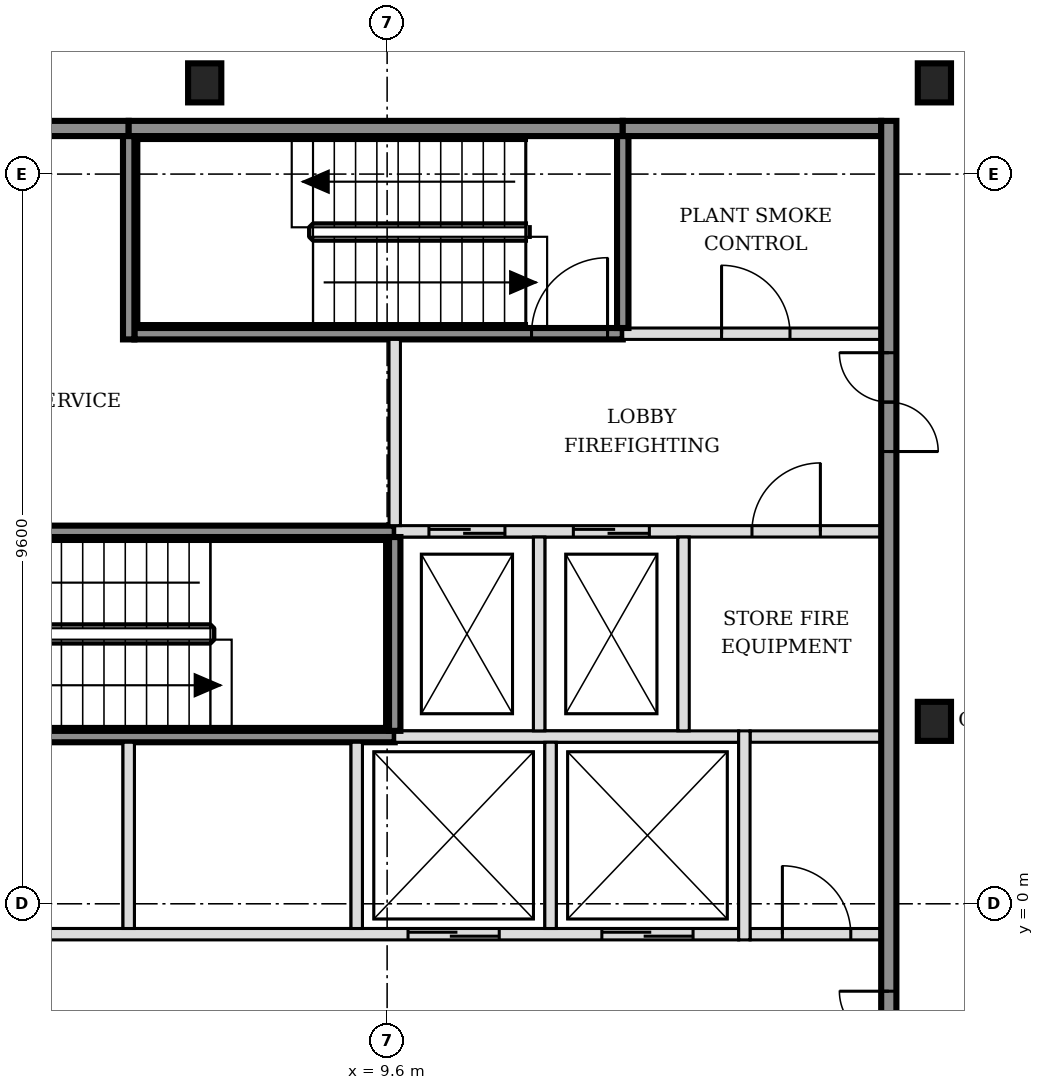
"""IFC4 building model, lengths in metres.
Left out: names, types, materials, properties, quantities, classifications, styles, units other than length and angle.
Written with IfcOpenShell. Run it as: python <this file> out.ifc"""

import sys

from ifc_helpers import new_model, si_unit, direction, frame, frame_2d, origin, origin_2d, place, context, subcontext, project, spatial, rectangle, i_section, extrude, element, fill, save


model = new_model("IFC4")
c1 = context("Model", 3, precision=1e-05, world=origin(), true_north=direction((0.0, 1.0)))
c2 = subcontext(c1, "Body", "Model", "MODEL_VIEW")
j1 = project(units=[si_unit("LENGTHUNIT", "METRE"), si_unit("PLANEANGLEUNIT", "RADIAN")], contexts=[c1])
p1 = place(None, origin())
s1 = spatial("IfcSite", under=j1, at=p1, CompositionType="ELEMENT")
p2 = place(p1, origin())
s2 = spatial("IfcBuilding", under=s1, at=p2, CompositionType="ELEMENT")
p3 = place(p2, frame((0.0, 0.0, 76.2)))
s3 = spatial("IfcBuildingStorey", under=s2, at=p3, CompositionType="ELEMENT", Elevation=76.2)
for number, where, z_axis, x_axis in (
    (1, (16.8, 2.4, -0.15), (0.0, 0.0, 1.0), (1.0, 0.0, 0.0)),
    (2, (7.2, 10.8, -0.15), (0.0, 0.0, 1.0), (1.0, 0.0, 0.0)),
    (3, (16.8, 10.8, -0.15), (0.0, 0.0, 1.0), (1.0, 0.0, 0.0)),
):
    element("IfcColumn", number, at=place(p3, frame(where, z_axis=z_axis, x_axis=x_axis)), inside=s3, PredefinedType="COLUMN", context=c2, shape_type="SweptSolid", body=[
        extrude(i_section(OverallWidth=0.437, OverallDepth=0.514, WebThickness=0.061, FlangeThickness=0.097, FilletRadius=0.015, at=origin_2d()), origin(), (0.0, 0.0, 1.0), 3.6),
    ])
p4 = place(p3, frame((-1.7, -0.4, 0.0), z_axis=(0.0, 0.0, 1.0), x_axis=(1.0, 0.0, 0.0)))
e4 = element("IfcWall", 4, at=p4, inside=s3, PredefinedType="SOLIDWALL", context=c2, shape_type="SweptSolid", body=[
    extrude(rectangle(XDim=15.925, YDim=0.15, at=frame_2d((7.962, 0.0))), origin(), (0.0, 0.0, 1.0), 3.45),
])
p5 = place(p4, frame((0.6, 0.0, 0.0)))
e5 = element("IfcOpeningElement", 5, at=p5, cuts=e4, PredefinedType="OPENING", context=c2, shape_type="SweptSolid", body=[
    extrude(rectangle(XDim=1.1, YDim=2.1, at=frame_2d((0.55, 1.05))), frame((0.0, 0.085, 0.0), z_axis=(0.0, -1.0, 0.0), x_axis=(1.0, 0.0, 0.0)), (0.0, 0.0, 1.0), 0.17),
])
p6 = place(p4, frame((3.1, 0.0, 0.0)))
e6 = element("IfcOpeningElement", 6, at=p6, cuts=e4, PredefinedType="OPENING", context=c2, shape_type="SweptSolid", body=[
    extrude(rectangle(XDim=1.1, YDim=2.1, at=frame_2d((0.55, 1.05))), frame((0.0, 0.085, 0.0), z_axis=(0.0, -1.0, 0.0), x_axis=(1.0, 0.0, 0.0)), (0.0, 0.0, 1.0), 0.17),
])
p7 = place(p4, frame((11.575, 0.0, 0.0)))
e7 = element("IfcOpeningElement", 7, at=p7, cuts=e4, PredefinedType="OPENING", context=c2, shape_type="SweptSolid", body=[
    extrude(rectangle(XDim=1.2, YDim=2.1, at=frame_2d((0.6, 1.05))), frame((0.0, 0.085, 0.0), z_axis=(0.0, -1.0, 0.0), x_axis=(1.0, 0.0, 0.0)), (0.0, 0.0, 1.0), 0.17),
])
p8 = place(p4, frame((14.125, 0.0, 0.0)))
e8 = element("IfcOpeningElement", 8, at=p8, cuts=e4, PredefinedType="OPENING", context=c2, shape_type="SweptSolid", body=[
    extrude(rectangle(XDim=1.2, YDim=2.1, at=frame_2d((0.6, 1.05))), frame((0.0, 0.085, 0.0), z_axis=(0.0, -1.0, 0.0), x_axis=(1.0, 0.0, 0.0)), (0.0, 0.0, 1.0), 0.17),
])
p9 = place(p3, frame((14.375, -0.4, 0.0), z_axis=(0.0, 0.0, 1.0), x_axis=(1.0, 0.0, 0.0)))
e9 = element("IfcWall", 9, at=p9, inside=s3, PredefinedType="PARTITIONING", context=c2, shape_type="SweptSolid", body=[
    extrude(rectangle(XDim=1.725, YDim=0.15, at=frame_2d((0.863, 0.0))), origin(), (0.0, 0.0, 1.0), 3.45),
])
p10 = place(p9, frame((0.425, 0.0, 0.0)))
e10 = element("IfcOpeningElement", 10, at=p10, cuts=e9, PredefinedType="OPENING", context=c2, shape_type="SweptSolid", body=[
    extrude(rectangle(XDim=0.9, YDim=2.1, at=frame_2d((0.45, 1.05))), frame((0.0, 0.085, 0.0), z_axis=(0.0, -1.0, 0.0), x_axis=(1.0, 0.0, 0.0)), (0.0, 0.0, 1.0), 0.17),
])
p11 = place(p3, frame((3.2, 2.2, 0.0), z_axis=(0.0, 0.0, 1.0), x_axis=(1.0, 0.0, 0.0)))
e11 = element("IfcWall", 11, at=p11, inside=s3, PredefinedType="SOLIDWALL", context=c2, shape_type="SweptSolid", body=[
    extrude(rectangle(XDim=6.5, YDim=0.15, at=frame_2d((3.25, 0.0))), origin(), (0.0, 0.0, 1.0), 3.45),
])
p12 = place(p3, frame((9.7, 2.2, 0.0), z_axis=(0.0, 0.0, 1.0), x_axis=(1.0, 0.0, 0.0)))
e12 = element("IfcWall", 12, at=p12, inside=s3, PredefinedType="SOLIDWALL", context=c2, shape_type="SweptSolid", body=[
    extrude(rectangle(XDim=4.525, YDim=0.15, at=frame_2d((2.263, 0.0))), origin(), (0.0, 0.0, 1.0), 3.45),
])
p13 = place(p3, frame((14.375, 2.2, 0.0), z_axis=(0.0, 0.0, 1.0), x_axis=(1.0, 0.0, 0.0)))
e13 = element("IfcWall", 13, at=p13, inside=s3, PredefinedType="PARTITIONING", context=c2, shape_type="SweptSolid", body=[
    extrude(rectangle(XDim=1.725, YDim=0.15, at=frame_2d((0.863, 0.0))), origin(), (0.0, 0.0, 1.0), 3.45),
])
p14 = place(p3, frame((3.275, 4.9, 0.0), z_axis=(0.0, 0.0, 1.0), x_axis=(1.0, 0.0, 0.0)))
e14 = element("IfcWall", 14, at=p14, inside=s3, PredefinedType="SOLIDWALL", context=c2, shape_type="SweptSolid", body=[
    extrude(rectangle(XDim=6.425, YDim=0.15, at=frame_2d((3.212, 0.0))), origin(), (0.0, 0.0, 1.0), 3.45),
])
p15 = place(p14, frame((0.1, 0.0, 0.0)))
e15 = element("IfcOpeningElement", 15, at=p15, cuts=e14, PredefinedType="OPENING", context=c2, shape_type="SweptSolid", body=[
    extrude(rectangle(XDim=1.0, YDim=2.1, at=frame_2d((0.5, 1.05))), frame((0.0, 0.085, 0.0), z_axis=(0.0, -1.0, 0.0), x_axis=(1.0, 0.0, 0.0)), (0.0, 0.0, 1.0), 0.17),
])
p16 = place(p3, frame((9.7, 4.9, 0.0), z_axis=(0.0, 0.0, 1.0), x_axis=(1.0, 0.0, 0.0)))
e16 = element("IfcWall", 16, at=p16, inside=s3, PredefinedType="SOLIDWALL", context=c2, shape_type="SweptSolid", body=[
    extrude(rectangle(XDim=6.4, YDim=0.15, at=frame_2d((3.2, 0.0))), origin(), (0.0, 0.0, 1.0), 3.45),
])
p17 = place(p16, frame((0.45, 0.0, 0.0)))
e17 = element("IfcOpeningElement", 17, at=p17, cuts=e16, PredefinedType="OPENING", context=c2, shape_type="SweptSolid", body=[
    extrude(rectangle(XDim=1.0, YDim=2.1, at=frame_2d((0.5, 1.05))), frame((0.0, 0.085, 0.0), z_axis=(0.0, -1.0, 0.0), x_axis=(1.0, 0.0, 0.0)), (0.0, 0.0, 1.0), 0.17),
])
p18 = place(p16, frame((2.35, 0.0, 0.0)))
e18 = element("IfcOpeningElement", 18, at=p18, cuts=e16, PredefinedType="OPENING", context=c2, shape_type="SweptSolid", body=[
    extrude(rectangle(XDim=1.0, YDim=2.1, at=frame_2d((0.5, 1.05))), frame((0.0, 0.085, 0.0), z_axis=(0.0, -1.0, 0.0), x_axis=(1.0, 0.0, 0.0)), (0.0, 0.0, 1.0), 0.17),
])
p19 = place(p16, frame((4.7, 0.0, 0.0)))
e19 = element("IfcOpeningElement", 19, at=p19, cuts=e16, PredefinedType="OPENING", context=c2, shape_type="SweptSolid", body=[
    extrude(rectangle(XDim=0.9, YDim=2.1, at=frame_2d((0.45, 1.05))), frame((0.0, 0.085, 0.0), z_axis=(0.0, -1.0, 0.0), x_axis=(1.0, 0.0, 0.0)), (0.0, 0.0, 1.0), 0.17),
])
p20 = place(p3, frame((6.275, 7.5, 0.0), z_axis=(0.0, 0.0, 1.0), x_axis=(1.0, 0.0, 0.0)))
e20 = element("IfcWall", 20, at=p20, inside=s3, PredefinedType="SOLIDWALL", context=c2, shape_type="SweptSolid", body=[
    extrude(rectangle(XDim=6.425, YDim=0.15, at=frame_2d((3.212, 0.0))), origin(), (0.0, 0.0, 1.0), 3.45),
])
p21 = place(p20, frame((5.225, 0.0, 0.0)))
e21 = element("IfcOpeningElement", 21, at=p21, cuts=e20, PredefinedType="OPENING", context=c2, shape_type="SweptSolid", body=[
    extrude(rectangle(XDim=1.0, YDim=2.1, at=frame_2d((0.5, 1.05))), frame((0.0, 0.085, 0.0), z_axis=(0.0, -1.0, 0.0), x_axis=(1.0, 0.0, 0.0)), (0.0, 0.0, 1.0), 0.17),
])
p22 = place(p3, frame((12.7, 7.5, 0.0), z_axis=(0.0, 0.0, 1.0), x_axis=(1.0, 0.0, 0.0)))
e22 = element("IfcWall", 22, at=p22, inside=s3, PredefinedType="SOLIDWALL", context=c2, shape_type="SweptSolid", body=[
    extrude(rectangle(XDim=3.4, YDim=0.15, at=frame_2d((1.7, 0.0))), origin(), (0.0, 0.0, 1.0), 3.45),
])
p23 = place(p22, frame((1.3, 0.0, 0.0)))
e23 = element("IfcOpeningElement", 23, at=p23, cuts=e22, PredefinedType="OPENING", context=c2, shape_type="SweptSolid", body=[
    extrude(rectangle(XDim=0.9, YDim=2.1, at=frame_2d((0.45, 1.05))), frame((0.0, 0.085, 0.0), z_axis=(0.0, -1.0, 0.0), x_axis=(1.0, 0.0, 0.0)), (0.0, 0.0, 1.0), 0.17),
])
p24 = place(p3, frame((-1.7, 10.2, 0.0), z_axis=(0.0, 0.0, 1.0), x_axis=(1.0, 0.0, 0.0)))
e24 = element("IfcWall", 24, at=p24, inside=s3, PredefinedType="SOLIDWALL", context=c2, shape_type="SweptSolid", body=[
    extrude(rectangle(XDim=7.9, YDim=0.2, at=frame_2d((3.95, 0.0))), origin(), (0.0, 0.0, 1.0), 3.45),
])
p25 = place(p3, frame((6.2, 10.2, 0.0), z_axis=(0.0, 0.0, 1.0), x_axis=(1.0, 0.0, 0.0)))
e25 = element("IfcWall", 25, at=p25, inside=s3, PredefinedType="SOLIDWALL", context=c2, shape_type="SweptSolid", body=[
    extrude(rectangle(XDim=6.5, YDim=0.2, at=frame_2d((3.25, 0.0))), origin(), (0.0, 0.0, 1.0), 3.45),
])
p26 = place(p3, frame((12.7, 10.2, 0.0), z_axis=(0.0, 0.0, 1.0), x_axis=(1.0, 0.0, 0.0)))
e26 = element("IfcWall", 26, at=p26, inside=s3, PredefinedType="SOLIDWALL", context=c2, shape_type="SweptSolid", body=[
    extrude(rectangle(XDim=3.4, YDim=0.2, at=frame_2d((1.7, 0.0))), origin(), (0.0, 0.0, 1.0), 3.45),
])
p27 = place(p3, frame((6.2, -0.325, 0.0), z_axis=(0.0, 0.0, 1.0), x_axis=(0.0, 1.0, 0.0)))
e27 = element("IfcWall", 27, at=p27, inside=s3, PredefinedType="SOLIDWALL", context=c2, shape_type="SweptSolid", body=[
    extrude(rectangle(XDim=2.45, YDim=0.15, at=frame_2d((1.225, 0.0))), origin(), (0.0, 0.0, 1.0), 3.45),
])
p28 = place(p3, frame((6.2, 7.425, 0.0), z_axis=(0.0, 0.0, 1.0), x_axis=(0.0, 1.0, 0.0)))
e28 = element("IfcWall", 28, at=p28, inside=s3, PredefinedType="SOLIDWALL", context=c2, shape_type="SweptSolid", body=[
    extrude(rectangle(XDim=2.675, YDim=0.15, at=frame_2d((1.337, 0.0))), origin(), (0.0, 0.0, 1.0), 3.45),
])
p29 = place(p3, frame((9.2, -0.325, 0.0), z_axis=(0.0, 0.0, 1.0), x_axis=(0.0, 1.0, 0.0)))
e29 = element("IfcWall", 29, at=p29, inside=s3, PredefinedType="SOLIDWALL", context=c2, shape_type="SweptSolid", body=[
    extrude(rectangle(XDim=2.45, YDim=0.15, at=frame_2d((1.225, 0.0))), origin(), (0.0, 0.0, 1.0), 3.45),
])
p30 = place(p3, frame((9.7, 2.275, 0.0), z_axis=(0.0, 0.0, 1.0), x_axis=(0.0, 1.0, 0.0)))
e30 = element("IfcWall", 30, at=p30, inside=s3, PredefinedType="SOLIDWALL", context=c2, shape_type="SweptSolid", body=[
    extrude(rectangle(XDim=2.55, YDim=0.15, at=frame_2d((1.275, 0.0))), origin(), (0.0, 0.0, 1.0), 3.45),
])
p31 = place(p3, frame((9.7, 4.975, 0.0), z_axis=(0.0, 0.0, 1.0), x_axis=(0.0, 1.0, 0.0)))
e31 = element("IfcWall", 31, at=p31, inside=s3, PredefinedType="SOLIDWALL", context=c2, shape_type="SweptSolid", body=[
    extrude(rectangle(XDim=2.45, YDim=0.15, at=frame_2d((1.225, 0.0))), origin(), (0.0, 0.0, 1.0), 3.45),
])
p32 = place(p3, frame((11.6, 2.275, 0.0), z_axis=(0.0, 0.0, 1.0), x_axis=(0.0, 1.0, 0.0)))
e32 = element("IfcWall", 32, at=p32, inside=s3, PredefinedType="SOLIDWALL", context=c2, shape_type="SweptSolid", body=[
    extrude(rectangle(XDim=2.55, YDim=0.15, at=frame_2d((1.275, 0.0))), origin(), (0.0, 0.0, 1.0), 3.45),
])
p33 = place(p3, frame((11.75, -0.325, 0.0), z_axis=(0.0, 0.0, 1.0), x_axis=(0.0, 1.0, 0.0)))
e33 = element("IfcWall", 33, at=p33, inside=s3, PredefinedType="SOLIDWALL", context=c2, shape_type="SweptSolid", body=[
    extrude(rectangle(XDim=2.45, YDim=0.15, at=frame_2d((1.225, 0.0))), origin(), (0.0, 0.0, 1.0), 3.45),
])
p34 = place(p3, frame((12.7, 7.575, 0.0), z_axis=(0.0, 0.0, 1.0), x_axis=(0.0, 1.0, 0.0)))
e34 = element("IfcWall", 34, at=p34, inside=s3, PredefinedType="SOLIDWALL", context=c2, shape_type="SweptSolid", body=[
    extrude(rectangle(XDim=2.525, YDim=0.15, at=frame_2d((1.263, 0.0))), origin(), (0.0, 0.0, 1.0), 3.45),
])
p35 = place(p3, frame((13.5, 2.275, 0.0), z_axis=(0.0, 0.0, 1.0), x_axis=(0.0, 1.0, 0.0)))
e35 = element("IfcWall", 35, at=p35, inside=s3, PredefinedType="SOLIDWALL", context=c2, shape_type="SweptSolid", body=[
    extrude(rectangle(XDim=2.55, YDim=0.15, at=frame_2d((1.275, 0.0))), origin(), (0.0, 0.0, 1.0), 3.45),
])
p36 = place(p3, frame((14.3, -0.475, 0.0), z_axis=(0.0, 0.0, 1.0), x_axis=(0.0, 1.0, 0.0)))
e36 = element("IfcWall", 36, at=p36, inside=s3, PredefinedType="SOLIDWALL", context=c2, shape_type="SweptSolid", body=[
    extrude(rectangle(XDim=2.75, YDim=0.15, at=frame_2d((1.375, 0.0))), origin(), (0.0, 0.0, 1.0), 3.45),
])
p37 = place(p3, frame((16.2, -5.5, 0.0), z_axis=(0.0, 0.0, 1.0), x_axis=(0.0, 1.0, 0.0)))
e37 = element("IfcWall", 37, at=p37, inside=s3, PredefinedType="SOLIDWALL", context=c2, shape_type="SweptSolid", body=[
    extrude(rectangle(XDim=15.8, YDim=0.2, at=frame_2d((7.9, 0.0))), origin(), (0.0, 0.0, 1.0), 3.45),
])
p38 = place(p37, frame((3.05, 0.0, 0.0)))
e38 = element("IfcOpeningElement", 38, at=p38, cuts=e37, PredefinedType="OPENING", context=c2, shape_type="SweptSolid", body=[
    extrude(rectangle(XDim=1.3, YDim=2.1, at=frame_2d((0.65, 1.05))), frame((0.0, 0.11, 0.0), z_axis=(0.0, -1.0, 0.0), x_axis=(1.0, 0.0, 0.0)), (0.0, 0.0, 1.0), 0.22),
])
p39 = place(p37, frame((11.45, 0.0, 0.0)))
e39 = element("IfcOpeningElement", 39, at=p39, cuts=e37, PredefinedType="OPENING", context=c2, shape_type="SweptSolid", body=[
    extrude(rectangle(XDim=1.3, YDim=2.1, at=frame_2d((0.65, 1.05))), frame((0.0, 0.11, 0.0), z_axis=(0.0, -1.0, 0.0), x_axis=(1.0, 0.0, 0.0)), (0.0, 0.0, 1.0), 0.22),
])
p40 = place(p7, origin())
e40 = element("IfcDoor", 40, at=p40, inside=s3, OperationType="DOUBLE_DOOR_SLIDING", PredefinedType="DOOR", context=c2, shape_type="SweptSolid", body=[
    extrude(rectangle(XDim=1.2, YDim=2.1, at=frame_2d((0.6, 1.05))), frame((0.0, 0.025, 0.0), z_axis=(0.0, -1.0, 0.0), x_axis=(1.0, 0.0, 0.0)), (0.0, 0.0, 1.0), 0.05),
])
fill(e7, e40)
p41 = place(p8, origin())
e41 = element("IfcDoor", 41, at=p41, inside=s3, OperationType="DOUBLE_DOOR_SLIDING", PredefinedType="DOOR", context=c2, shape_type="SweptSolid", body=[
    extrude(rectangle(XDim=1.2, YDim=2.1, at=frame_2d((0.6, 1.05))), frame((0.0, 0.025, 0.0), z_axis=(0.0, -1.0, 0.0), x_axis=(1.0, 0.0, 0.0)), (0.0, 0.0, 1.0), 0.05),
])
fill(e8, e41)
p42 = place(p17, origin())
e42 = element("IfcDoor", 42, at=p42, inside=s3, OperationType="DOUBLE_DOOR_SLIDING", PredefinedType="DOOR", context=c2, shape_type="SweptSolid", body=[
    extrude(rectangle(XDim=1.0, YDim=2.1, at=frame_2d((0.5, 1.05))), frame((0.0, 0.025, 0.0), z_axis=(0.0, -1.0, 0.0), x_axis=(1.0, 0.0, 0.0)), (0.0, 0.0, 1.0), 0.05),
])
fill(e17, e42)
p43 = place(p18, origin())
e43 = element("IfcDoor", 43, at=p43, inside=s3, OperationType="DOUBLE_DOOR_SLIDING", PredefinedType="DOOR", context=c2, shape_type="SweptSolid", body=[
    extrude(rectangle(XDim=1.0, YDim=2.1, at=frame_2d((0.5, 1.05))), frame((0.0, 0.025, 0.0), z_axis=(0.0, -1.0, 0.0), x_axis=(1.0, 0.0, 0.0)), (0.0, 0.0, 1.0), 0.05),
])
fill(e18, e43)
p44 = place(p21, origin())
e44 = element("IfcDoor", 44, at=p44, inside=s3, OperationType="SINGLE_SWING_RIGHT", PredefinedType="DOOR", context=c2, shape_type="SweptSolid", body=[
    extrude(rectangle(XDim=1.0, YDim=2.1, at=frame_2d((0.5, 1.05))), frame((0.0, 0.025, 0.0), z_axis=(0.0, -1.0, 0.0), x_axis=(1.0, 0.0, 0.0)), (0.0, 0.0, 1.0), 0.05),
])
fill(e21, e44)
p45 = place(p38, origin())
e45 = element("IfcDoor", 45, at=p45, inside=s3, OperationType="DOUBLE_DOOR_SINGLE_SWING", PredefinedType="DOOR", context=c2, shape_type="SweptSolid", body=[
    extrude(rectangle(XDim=1.3, YDim=2.1, at=frame_2d((0.65, 1.05))), frame((0.0, 0.025, 0.0), z_axis=(0.0, -1.0, 0.0), x_axis=(1.0, 0.0, 0.0)), (0.0, 0.0, 1.0), 0.05),
])
fill(e38, e45)
p46 = place(p39, origin())
e46 = element("IfcDoor", 46, at=p46, inside=s3, OperationType="DOUBLE_DOOR_SINGLE_SWING", PredefinedType="DOOR", context=c2, shape_type="SweptSolid", body=[
    extrude(rectangle(XDim=1.3, YDim=2.1, at=frame_2d((0.65, 1.05))), frame((0.0, 0.025, 0.0), z_axis=(0.0, -1.0, 0.0), x_axis=(1.0, 0.0, 0.0)), (0.0, 0.0, 1.0), 0.05),
])
fill(e39, e46)
p47 = place(p10, origin())
e47 = element("IfcDoor", 47, at=p47, inside=s3, OperationType="SINGLE_SWING_LEFT", PredefinedType="DOOR", context=c2, shape_type="SweptSolid", body=[
    extrude(rectangle(XDim=0.9, YDim=2.1, at=frame_2d((0.45, 1.05))), frame((0.0, 0.025, 0.0), z_axis=(0.0, -1.0, 0.0), x_axis=(1.0, 0.0, 0.0)), (0.0, 0.0, 1.0), 0.05),
])
fill(e10, e47)
p48 = place(p19, origin())
e48 = element("IfcDoor", 48, at=p48, inside=s3, OperationType="SINGLE_SWING_RIGHT", PredefinedType="DOOR", context=c2, shape_type="SweptSolid", body=[
    extrude(rectangle(XDim=0.9, YDim=2.1, at=frame_2d((0.45, 1.05))), frame((0.0, 0.025, 0.0), z_axis=(0.0, -1.0, 0.0), x_axis=(1.0, 0.0, 0.0)), (0.0, 0.0, 1.0), 0.05),
])
fill(e19, e48)
p49 = place(p23, origin())
e49 = element("IfcDoor", 49, at=p49, inside=s3, OperationType="SINGLE_SWING_LEFT", PredefinedType="DOOR", context=c2, shape_type="SweptSolid", body=[
    extrude(rectangle(XDim=0.9, YDim=2.1, at=frame_2d((0.45, 1.05))), frame((0.0, 0.025, 0.0), z_axis=(0.0, -1.0, 0.0), x_axis=(1.0, 0.0, 0.0)), (0.0, 0.0, 1.0), 0.05),
])
fill(e23, e49)
save(model, sys.argv[1])
